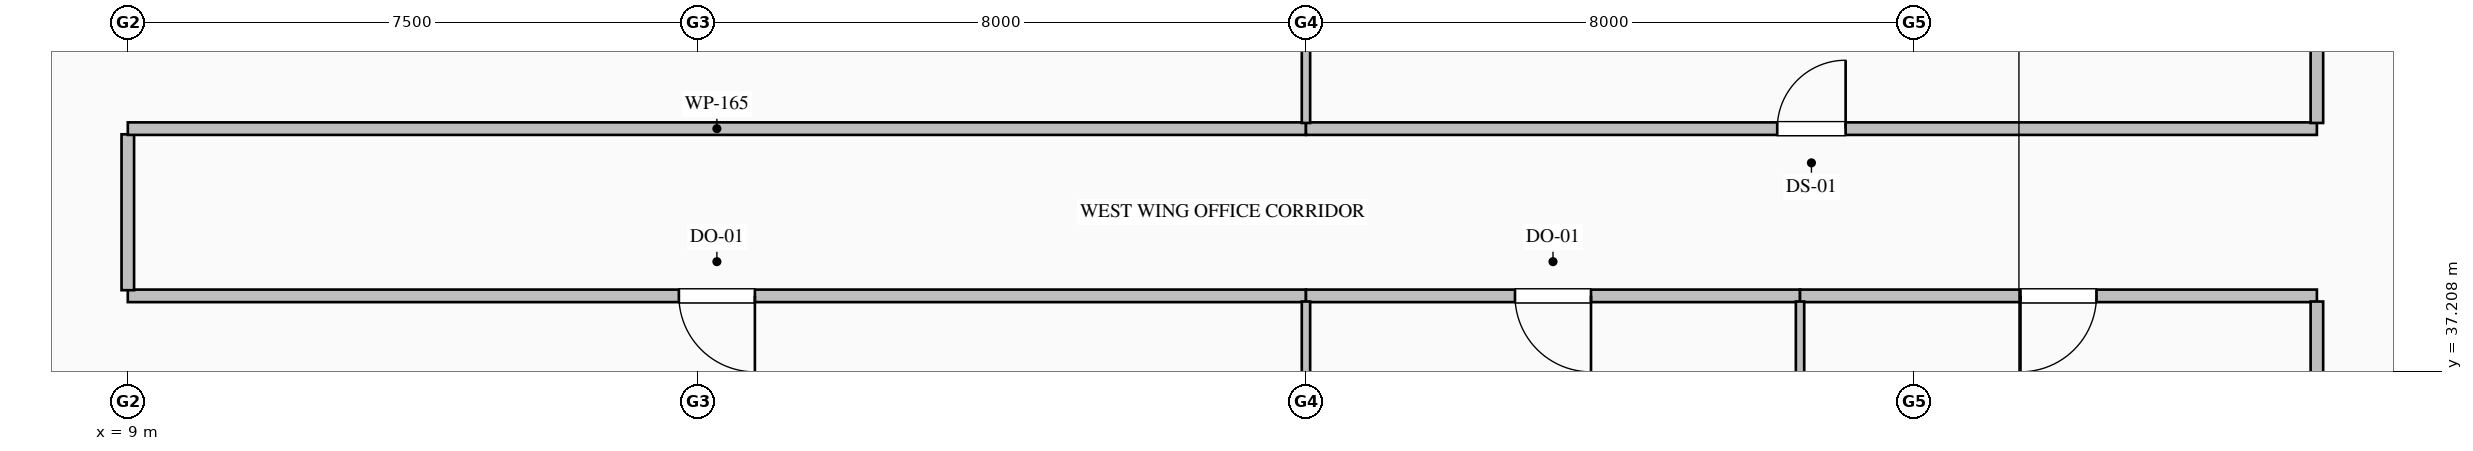
"""IFC4 building model, lengths in metres.
Left out: names, types, materials, properties, quantities, classifications, styles, units other than length and angle.
Written with IfcOpenShell. Run it as: python <this file> out.ifc"""

import sys

from ifc_helpers import new_model, si_unit, direction, frame, frame_2d, origin, place, context, subcontext, project, spatial, rectangle, extrude, element, fill, save


model = new_model("IFC4")
c1 = context("Model", 3, precision=1e-05, world=origin(), true_north=direction((0.0, 1.0)))
c2 = subcontext(c1, "Body", "Model", "MODEL_VIEW")
j1 = project(units=[si_unit("LENGTHUNIT", "METRE"), si_unit("PLANEANGLEUNIT", "RADIAN")], contexts=[c1])
p1 = place(None, origin())
s1 = spatial("IfcSite", under=j1, at=p1, CompositionType="ELEMENT")
p2 = place(p1, origin())
s2 = spatial("IfcBuilding", under=s1, at=p2, CompositionType="ELEMENT")
p3 = place(p2, frame((0.0, 0.0, 64.2)))
s3 = spatial("IfcBuildingStorey", under=s2, at=p3, CompositionType="ELEMENT", Elevation=64.2)
p4 = place(p3, frame((24.5, 38.2, 0.0), z_axis=(0.0, 0.0, 1.0), x_axis=(-1.0, 0.0, 0.0)))
e1 = element("IfcWall", 1, at=p4, inside=s3, PredefinedType="PARTITIONING", context=c2, shape_type="SweptSolid", body=[
    extrude(rectangle(XDim=15.5, YDim=0.165, at=frame_2d((7.75, 0.0))), origin(), (0.0, 0.0, 1.0), 3.75),
])
p5 = place(p4, frame((7.25, 0.0, 0.0)))
e2 = element("IfcOpeningElement", 2, at=p5, cuts=e1, PredefinedType="OPENING", context=c2, shape_type="SweptSolid", body=[
    extrude(rectangle(XDim=1.0, YDim=2.15, at=frame_2d((0.5, 1.075))), frame((0.0, 0.093, 0.0), z_axis=(0.0, -1.0, 0.0), x_axis=(1.0, 0.0, 0.0)), (0.0, 0.0, 1.0), 0.185),
])
p6 = place(p3, frame((9.0, 38.274, 0.0), z_axis=(0.0, 0.0, 1.0), x_axis=(0.0, 1.0, 0.0)))
e3 = element("IfcWall", 3, at=p6, inside=s3, PredefinedType="PARTITIONING", context=c2, shape_type="SweptSolid", body=[
    extrude(rectangle(XDim=2.051, YDim=0.165, at=frame_2d((1.025, 0.0))), origin(), (0.0, 0.0, 1.0), 3.042),
])
p7 = place(p3, frame((9.0, 40.4, 0.0), z_axis=(0.0, 0.0, 1.0), x_axis=(1.0, 0.0, 0.0)))
e4 = element("IfcWall", 4, at=p7, inside=s3, PredefinedType="PARTITIONING", context=c2, shape_type="SweptSolid", body=[
    extrude(rectangle(XDim=15.5, YDim=0.165, at=frame_2d((7.75, 0.0))), origin(), (0.0, 0.0, 1.0), 3.75),
])
p8 = place(p3, frame((24.5, 40.4, 0.0), z_axis=(0.0, 0.0, 1.0), x_axis=(1.0, 0.0, 0.0)))
e5 = element("IfcWall", 5, at=p8, inside=s3, PredefinedType="PARTITIONING", context=c2, shape_type="SweptSolid", body=[
    extrude(rectangle(XDim=13.3, YDim=0.165, at=frame_2d((6.65, 0.0))), origin(), (0.0, 0.0, 1.0), 3.75),
])
p9 = place(p8, frame((6.2, 0.0, 0.0)))
e6 = element("IfcOpeningElement", 6, at=p9, cuts=e5, PredefinedType="OPENING", context=c2, shape_type="SweptSolid", body=[
    extrude(rectangle(XDim=0.9, YDim=2.15, at=frame_2d((0.45, 1.075))), frame((0.0, 0.093, 0.0), z_axis=(0.0, -1.0, 0.0), x_axis=(1.0, 0.0, 0.0)), (0.0, 0.0, 1.0), 0.185),
])
p10 = place(p3, frame((31.0, 38.2, 0.0), z_axis=(0.0, 0.0, 1.0), x_axis=(-1.0, 0.0, 0.0)))
e7 = element("IfcWall", 7, at=p10, inside=s3, PredefinedType="PARTITIONING", context=c2, shape_type="SweptSolid", body=[
    extrude(rectangle(XDim=6.5, YDim=0.165, at=frame_2d((3.25, 0.0))), origin(), (0.0, 0.0, 1.0), 3.75),
])
p11 = place(p10, frame((2.75, 0.0, 0.0)))
e8 = element("IfcOpeningElement", 8, at=p11, cuts=e7, PredefinedType="OPENING", context=c2, shape_type="SweptSolid", body=[
    extrude(rectangle(XDim=1.0, YDim=2.15, at=frame_2d((0.5, 1.075))), frame((0.0, 0.093, 0.0), z_axis=(0.0, -1.0, 0.0), x_axis=(1.0, 0.0, 0.0)), (0.0, 0.0, 1.0), 0.185),
])
p12 = place(p3, frame((37.8, 38.2, 0.0), z_axis=(0.0, 0.0, 1.0), x_axis=(-1.0, 0.0, 0.0)))
e9 = element("IfcWall", 9, at=p12, inside=s3, PredefinedType="PARTITIONING", context=c2, shape_type="SweptSolid", body=[
    extrude(rectangle(XDim=6.8, YDim=0.165, at=frame_2d((3.4, 0.0))), origin(), (0.0, 0.0, 1.0), 3.75),
])
p13 = place(p12, frame((2.9, 0.0, 0.0)))
e10 = element("IfcOpeningElement", 10, at=p13, cuts=e9, PredefinedType="OPENING", context=c2, shape_type="SweptSolid", body=[
    extrude(rectangle(XDim=1.0, YDim=2.15, at=frame_2d((0.5, 1.075))), frame((0.0, 0.093, 0.0), z_axis=(0.0, -1.0, 0.0), x_axis=(1.0, 0.0, 0.0)), (0.0, 0.0, 1.0), 0.185),
])
p14 = place(p3, frame((37.8, 40.475, 0.0), z_axis=(0.0, 0.0, 1.0), x_axis=(0.0, 1.0, 0.0)))
e11 = element("IfcWall", 11, at=p14, inside=s3, PredefinedType="PARTITIONING", context=c2, shape_type="SweptSolid", body=[
    extrude(rectangle(XDim=3.651, YDim=0.165, at=frame_2d((1.825, 0.0))), origin(), (0.0, 0.0, 1.0), 3.75),
])
p15 = place(p3, frame((37.8, 31.6, 0.0), z_axis=(0.0, 0.0, 1.0), x_axis=(0.0, 1.0, 0.0)))
e12 = element("IfcWall", 12, at=p15, inside=s3, PredefinedType="PARTITIONING", context=c2, shape_type="SweptSolid", body=[
    extrude(rectangle(XDim=6.525, YDim=0.165, at=frame_2d((3.263, 0.0))), origin(), (0.0, 0.0, 1.0), 3.75),
])
p16 = place(p3, frame((24.5, 51.668, 0.0), z_axis=(0.0, 0.0, 1.0), x_axis=(0.0, -1.0, 0.0)))
e13 = element("IfcWall", 13, at=p16, inside=s3, PredefinedType="MOVABLE", context=c2, shape_type="SweptSolid", body=[
    extrude(rectangle(XDim=11.193, YDim=0.11, at=frame_2d((5.597, 0.0))), origin(), (0.0, 0.0, 1.0), 3.042),
])
p17 = place(p3, frame((24.5, 38.125, 0.0), z_axis=(0.0, 0.0, 1.0), x_axis=(0.0, -1.0, 0.0)))
e14 = element("IfcWall", 14, at=p17, inside=s3, PredefinedType="MOVABLE", context=c2, shape_type="SweptSolid", body=[
    extrude(rectangle(XDim=9.793, YDim=0.11, at=frame_2d((4.897, 0.0))), origin(), (0.0, 0.0, 1.0), 3.042),
])
p18 = place(p3, frame((31.0, 38.125, 0.0), z_axis=(0.0, 0.0, 1.0), x_axis=(0.0, -1.0, 0.0)))
e15 = element("IfcWall", 15, at=p18, inside=s3, PredefinedType="MOVABLE", context=c2, shape_type="SweptSolid", body=[
    extrude(rectangle(XDim=9.793, YDim=0.11, at=frame_2d((4.897, 0.0))), origin(), (0.0, 0.0, 1.0), 3.75),
])
p19 = place(p5, origin())
e16 = element("IfcDoor", 16, at=p19, inside=s3, OperationType="SINGLE_SWING_LEFT", PredefinedType="DOOR", context=c2, shape_type="SweptSolid", body=[
    extrude(rectangle(XDim=1.0, YDim=2.15, at=frame_2d((0.5, 1.075))), frame((0.0, 0.025, 0.0), z_axis=(0.0, -1.0, 0.0), x_axis=(1.0, 0.0, 0.0)), (0.0, 0.0, 1.0), 0.05),
])
fill(e2, e16)
p20 = place(p9, origin())
e17 = element("IfcDoor", 17, at=p20, inside=s3, OperationType="SINGLE_SWING_RIGHT", PredefinedType="DOOR", context=c2, shape_type="SweptSolid", body=[
    extrude(rectangle(XDim=0.9, YDim=2.15, at=frame_2d((0.45, 1.075))), frame((0.0, 0.025, 0.0), z_axis=(0.0, -1.0, 0.0), x_axis=(1.0, 0.0, 0.0)), (0.0, 0.0, 1.0), 0.05),
])
fill(e6, e17)
p21 = place(p11, origin())
e18 = element("IfcDoor", 18, at=p21, inside=s3, OperationType="SINGLE_SWING_LEFT", PredefinedType="DOOR", context=c2, shape_type="SweptSolid", body=[
    extrude(rectangle(XDim=1.0, YDim=2.15, at=frame_2d((0.5, 1.075))), frame((0.0, 0.025, 0.0), z_axis=(0.0, -1.0, 0.0), x_axis=(1.0, 0.0, 0.0)), (0.0, 0.0, 1.0), 0.05),
])
fill(e8, e18)
p22 = place(p13, origin())
e19 = element("IfcDoor", 19, at=p22, inside=s3, OperationType="SINGLE_SWING_RIGHT", PredefinedType="DOOR", context=c2, shape_type="SweptSolid", body=[
    extrude(rectangle(XDim=1.0, YDim=2.15, at=frame_2d((0.5, 1.075))), frame((0.0, 0.025, 0.0), z_axis=(0.0, -1.0, 0.0), x_axis=(1.0, 0.0, 0.0)), (0.0, 0.0, 1.0), 0.05),
])
fill(e10, e19)
save(model, sys.argv[1])
